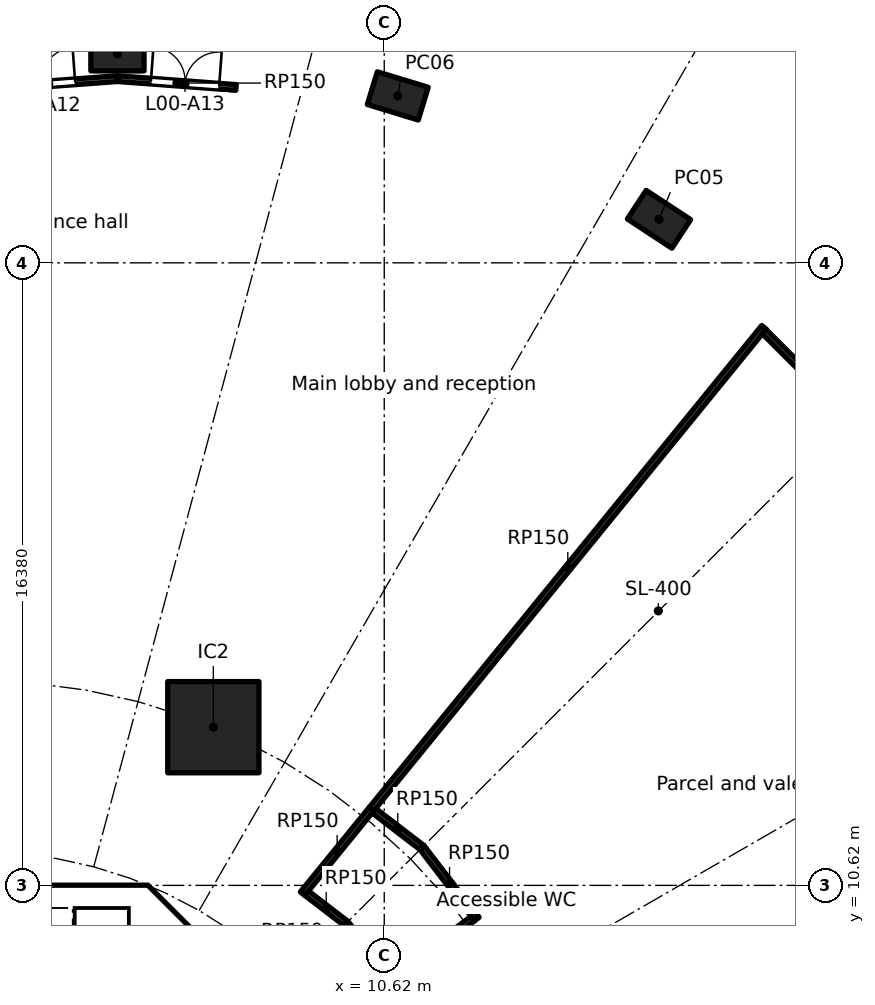
"""IFC4 building model, lengths in metres.
Left out: names, types, materials, properties, quantities, classifications, styles, units other than length and angle.
Written with IfcOpenShell. Run it as: python <this file> out.ifc"""

import sys

from ifc_helpers import new_model, si_unit, direction, frame, frame_2d, origin, origin_2d, place, context, subcontext, project, spatial, polyline, rectangle, hollow_rectangle, outline, extrude, element, fill, save


model = new_model("IFC4")
c1 = context("Model", 3, precision=1e-05, world=origin(), true_north=direction((0.0, 1.0)))
c2 = subcontext(c1, "Body", "Model", "MODEL_VIEW")
j1 = project(units=[si_unit("LENGTHUNIT", "METRE"), si_unit("PLANEANGLEUNIT", "RADIAN")], contexts=[c1])
p1 = place(None, origin())
s1 = spatial("IfcSite", under=j1, at=p1, CompositionType="ELEMENT")
p2 = place(p1, origin())
s2 = spatial("IfcBuilding", under=s1, at=p2, CompositionType="ELEMENT")
p3 = place(p2, origin())
s3 = spatial("IfcBuildingStorey", under=s2, at=p3, CompositionType="ELEMENT", Elevation=0.0)
for number, where, z_axis, x_axis in (
    (1, (17.85, 28.146, 0.0), (0.0, 0.0, 1.0), (-0.836, 0.549, 0.0)),
    (2, (10.976, 31.393, 0.0), (0.0, 0.0, 1.0), (-0.957, 0.292, 0.0)),
    (3, (3.6, 32.5, 0.0), (0.0, 0.0, 1.0), (-1.0, 0.0, 0.0)),
):
    element("IfcColumn", number, at=place(p3, frame(where, z_axis=z_axis, x_axis=x_axis)), inside=s3, PredefinedType="COLUMN", context=c2, shape_type="SweptSolid", body=[
        extrude(hollow_rectangle(XDim=1.4, YDim=0.9, WallThickness=0.05, at=origin_2d()), origin(), (0.0, 0.0, 1.0), 7.0),
    ])
p4 = place(p3, frame((6.123, 14.782, 0.0), z_axis=(0.0, 0.0, 1.0), x_axis=(1.0, 0.0, 0.0)))
e4 = element("IfcColumn", 4, at=p4, inside=s3, PredefinedType="COLUMN", context=c2, shape_type="SweptSolid", body=[
    extrude(rectangle(XDim=2.4, YDim=2.4, at=origin_2d()), origin(), (0.0, 0.0, 1.0), 7.0),
])
p5 = place(p3, frame((9.988, 4.613, 0.0), z_axis=(0.0, 0.0, 1.0), x_axis=(-0.707106781187, 0.707106781187, 0.0)))
e5 = element("IfcWall", 5, at=p5, inside=s3, PredefinedType="SHEAR", context=c2, shape_type="SweptSolid", body=[
    extrude(rectangle(XDim=7.602, YDim=0.6, at=frame_2d((3.801, 0.0))), origin(), (0.0, 0.0, 1.0), 6.7),
])
p6 = place(p5, frame((3.201, 0.0, 0.0)))
e6 = element("IfcOpeningElement", 6, at=p6, cuts=e5, PredefinedType="OPENING", context=c2, shape_type="SweptSolid", body=[
    extrude(rectangle(XDim=1.2, YDim=2.1, at=frame_2d((0.6, 1.05))), frame((0.0, 0.31, 0.0), z_axis=(0.0, -1.0, 0.0), x_axis=(1.0, 0.0, 0.0)), (0.0, 0.0, 1.0), 0.62),
])
p7 = place(p3, frame((3.801, 10.325, 0.0), z_axis=(0.0, 0.0, 1.0), x_axis=(-1.0, 0.0, 0.0)))
e7 = element("IfcWall", 7, at=p7, inside=s3, PredefinedType="SHEAR", context=c2, shape_type="SweptSolid", body=[
    extrude(rectangle(XDim=7.602, YDim=0.6, at=frame_2d((3.801, 0.0))), origin(), (0.0, 0.0, 1.0), 6.7),
])
p8 = place(p7, frame((0.151, 0.0, 0.0)))
e8 = element("IfcOpeningElement", 8, at=p8, cuts=e7, PredefinedType="OPENING", context=c2, shape_type="SweptSolid", body=[
    extrude(rectangle(XDim=1.1, YDim=2.1, at=frame_2d((0.55, 1.05))), frame((0.0, 0.31, 0.0), z_axis=(0.0, -1.0, 0.0), x_axis=(1.0, 0.0, 0.0)), (0.0, 0.0, 1.0), 0.62),
])
p9 = place(p3, frame((4.0, 7.025, 0.0), z_axis=(0.0, 0.0, 1.0), x_axis=(0.0, 1.0, 0.0)))
e9 = element("IfcWall", 9, at=p9, inside=s3, PredefinedType="SOLIDWALL", context=c2, shape_type="SweptSolid", body=[
    extrude(rectangle(XDim=3.0, YDim=0.2, at=frame_2d((1.5, 0.0))), origin(), (0.0, 0.0, 1.0), 6.7),
])
p10 = place(p9, frame((0.925, 0.0, 0.0)))
e10 = element("IfcOpeningElement", 10, at=p10, cuts=e9, PredefinedType="OPENING", context=c2, shape_type="SweptSolid", body=[
    extrude(rectangle(XDim=1.1, YDim=2.1, at=frame_2d((0.55, 1.05))), frame((0.0, 0.11, 0.0), z_axis=(0.0, -1.0, 0.0), x_axis=(1.0, 0.0, 0.0)), (0.0, 0.0, 1.0), 0.22),
])
p11 = place(p3, origin())
e11 = element("IfcWall", 11, at=p11, inside=s3, PredefinedType="SHEAR", context=c2, shape_type="SweptSolid", body=[
    extrude(outline(polyline([(4.825, 10.2), (4.401, 9.776), (4.152, 10.025), (3.801, 10.025), (3.801, 10.625), (4.401, 10.625), (4.825, 10.2)])), origin(), (0.0, 0.0, 1.0), 6.7),
])
p12 = place(p3, frame((-0.007, 31.578, 0.0), z_axis=(0.0, 0.0, 1.0), x_axis=(0.997233506708, 0.074332584365, 0.0)))
e12 = element("IfcWall", 12, at=p12, inside=s3, PredefinedType="PARTITIONING", context=c2, shape_type="SweptSolid", body=[
    extrude(rectangle(XDim=3.61, YDim=0.15, at=frame_2d((1.805, 0.0))), origin(), (0.0, 0.0, 1.0), 6.7),
])
p13 = place(p12, frame((0.701, 0.0, 0.0)))
e13 = element("IfcOpeningElement", 13, at=p13, cuts=e12, PredefinedType="OPENING", context=c2, shape_type="SweptSolid", body=[
    extrude(rectangle(XDim=1.8, YDim=2.1, at=frame_2d((0.9, 1.05))), frame((0.0, 0.085, 0.0), z_axis=(0.0, -1.0, 0.0), x_axis=(1.0, 0.0, 0.0)), (0.0, 0.0, 1.0), 0.17),
])
p14 = place(p3, frame((3.608, 31.846, 0.0), z_axis=(0.0, 0.0, 1.0), x_axis=(0.997228552186, -0.074399023545, 0.0)))
e14 = element("IfcWall", 14, at=p14, inside=s3, PredefinedType="PARTITIONING", context=c2, shape_type="SweptSolid", body=[
    extrude(rectangle(XDim=3.121, YDim=0.15, at=frame_2d((1.56, 0.0))), origin(), (0.0, 0.0, 1.0), 6.7),
])
p15 = place(p14, frame((0.875, 0.0, 0.0)))
e15 = element("IfcOpeningElement", 15, at=p15, cuts=e14, PredefinedType="OPENING", context=c2, shape_type="SweptSolid", body=[
    extrude(rectangle(XDim=1.8, YDim=2.1, at=frame_2d((0.9, 1.05))), frame((0.0, 0.085, 0.0), z_axis=(0.0, -1.0, 0.0), x_axis=(1.0, 0.0, 0.0)), (0.0, 0.0, 1.0), 0.17),
])
p16 = place(p3, frame((8.472, 10.401, 0.0), z_axis=(0.0, 0.0, 1.0), x_axis=(0.631544460315, 0.775339664048, 0.0)))
e16 = element("IfcWall", 16, at=p16, inside=s3, PredefinedType="PARTITIONING", context=c2, shape_type="SweptSolid", body=[
    extrude(rectangle(XDim=2.876, YDim=0.15, at=frame_2d((1.438, 0.0))), origin(), (0.0, 0.0, 1.0), 6.7),
])
p17 = place(p3, frame((9.607, 9.624, 0.0), z_axis=(0.0, 0.0, 1.0), x_axis=(-0.793421424222, 0.608672690028, 0.0)))
e17 = element("IfcWall", 17, at=p17, inside=s3, PredefinedType="PARTITIONING", context=c2, shape_type="SweptSolid", body=[
    extrude(rectangle(XDim=1.296, YDim=0.15, at=frame_2d((0.648, 0.0))), origin(), (0.0, 0.0, 1.0), 6.7),
])
p18 = place(p3, frame((10.348, 12.585, 0.0), z_axis=(0.0, 0.0, 1.0), x_axis=(0.793328373205, -0.608793965368, 0.0)))
e18 = element("IfcWall", 18, at=p18, inside=s3, PredefinedType="PARTITIONING", context=c2, shape_type="SweptSolid", body=[
    extrude(rectangle(XDim=1.584, YDim=0.15, at=frame_2d((0.792, 0.0))), origin(), (0.0, 0.0, 1.0), 6.7),
])
p19 = place(p3, frame((10.288, 12.631, 0.0), z_axis=(0.0, 0.0, 1.0), x_axis=(0.631545274273, 0.775339001046, 0.0)))
e19 = element("IfcWall", 19, at=p19, inside=s3, PredefinedType="PARTITIONING", context=c2, shape_type="SweptSolid", body=[
    extrude(rectangle(XDim=16.345, YDim=0.15, at=frame_2d((8.173, 0.0))), origin(), (0.0, 0.0, 1.0), 6.7),
])
p20 = place(p3, frame((10.774, 8.109, 0.0), z_axis=(0.0, 0.0, 1.0), x_axis=(-0.608754453805, 0.793358692504, 0.0)))
e20 = element("IfcWall", 20, at=p20, inside=s3, PredefinedType="PARTITIONING", context=c2, shape_type="SweptSolid", body=[
    extrude(rectangle(XDim=1.888, YDim=0.15, at=frame_2d((0.944, 0.0))), origin(), (0.0, 0.0, 1.0), 6.7),
])
p21 = place(p20, frame((0.5, 0.0, 0.0)))
e21 = element("IfcOpeningElement", 21, at=p21, cuts=e20, PredefinedType="OPENING", context=c2, shape_type="SweptSolid", body=[
    extrude(rectangle(XDim=0.9, YDim=2.1, at=frame_2d((0.45, 1.05))), frame((0.0, 0.085, 0.0), z_axis=(0.0, -1.0, 0.0), x_axis=(1.0, 0.0, 0.0)), (0.0, 0.0, 1.0), 0.17),
])
p22 = place(p3, frame((11.621, 11.604, 0.0), z_axis=(0.0, 0.0, 1.0), x_axis=(0.608759688573, -0.793354675771, 0.0)))
e22 = element("IfcWall", 22, at=p22, inside=s3, PredefinedType="PARTITIONING", context=c2, shape_type="SweptSolid", body=[
    extrude(rectangle(XDim=2.358, YDim=0.15, at=frame_2d((1.179, 0.0))), origin(), (0.0, 0.0, 1.0), 6.7),
])
p23 = place(p3, frame((12.951, 9.748, 0.0), z_axis=(0.0, 0.0, 1.0), x_axis=(-0.798970748419, -0.601369888813, 0.0)))
e23 = element("IfcWall", 23, at=p23, inside=s3, PredefinedType="PARTITIONING", context=c2, shape_type="SweptSolid", body=[
    extrude(rectangle(XDim=2.65, YDim=0.15, at=frame_2d((1.325, 0.0))), origin(), (0.0, 0.0, 1.0), 6.7),
])
p24 = place(p3, frame((20.617, 25.192, 0.0), z_axis=(0.0, 0.0, 1.0), x_axis=(0.707799198324, -0.706413685352, 0.0)))
e24 = element("IfcWall", 24, at=p24, inside=s3, PredefinedType="PARTITIONING", context=c2, shape_type="SweptSolid", body=[
    extrude(rectangle(XDim=3.7, YDim=0.15, at=frame_2d((1.85, 0.0))), origin(), (0.0, 0.0, 1.0), 6.7),
])
p25 = place(p8, frame((1.1, 0.0, 0.0), x_axis=(-1.0, 0.0, 0.0)))
e25 = element("IfcDoor", 25, at=p25, inside=s3, OperationType="SINGLE_SWING_LEFT", PredefinedType="DOOR", context=c2, shape_type="SweptSolid", body=[
    extrude(rectangle(XDim=1.1, YDim=2.1, at=frame_2d((0.55, 1.05))), frame((0.0, 0.025, 0.0), z_axis=(0.0, -1.0, 0.0), x_axis=(1.0, 0.0, 0.0)), (0.0, 0.0, 1.0), 0.05),
])
fill(e8, e25)
p26 = place(p13, origin())
e26 = element("IfcDoor", 26, at=p26, inside=s3, OperationType="DOUBLE_DOOR_SINGLE_SWING", PredefinedType="DOOR", context=c2, shape_type="SweptSolid", body=[
    extrude(rectangle(XDim=1.8, YDim=2.1, at=frame_2d((0.9, 1.05))), frame((0.0, 0.025, 0.0), z_axis=(0.0, -1.0, 0.0), x_axis=(1.0, 0.0, 0.0)), (0.0, 0.0, 1.0), 0.05),
])
fill(e13, e26)
p27 = place(p15, origin())
e27 = element("IfcDoor", 27, at=p27, inside=s3, OperationType="DOUBLE_DOOR_SINGLE_SWING", PredefinedType="DOOR", context=c2, shape_type="SweptSolid", body=[
    extrude(rectangle(XDim=1.8, YDim=2.1, at=frame_2d((0.9, 1.05))), frame((0.0, 0.025, 0.0), z_axis=(0.0, -1.0, 0.0), x_axis=(1.0, 0.0, 0.0)), (0.0, 0.0, 1.0), 0.05),
])
fill(e15, e27)
save(model, sys.argv[1])
